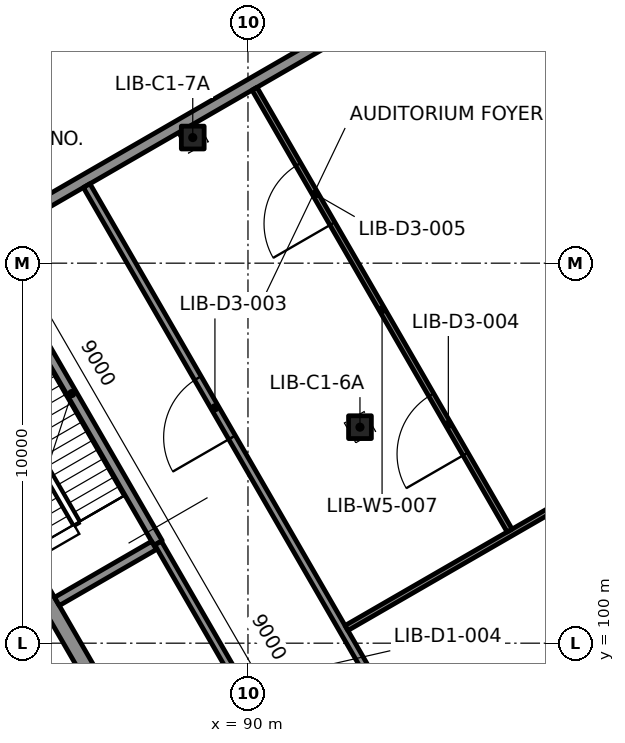
"""IFC4 building model, lengths in metres.
Left out: names, types, materials, properties, quantities, classifications, styles, units other than length and angle.
Written with IfcOpenShell. Run it as: python <this file> out.ifc"""

import sys

from ifc_helpers import new_model, si_unit, direction, frame, frame_2d, origin, origin_2d, place, context, subcontext, project, spatial, rectangle, extrude, element, fill, save


model = new_model("IFC4")
c1 = context("Model", 3, precision=1e-05, world=origin(), true_north=direction((0.0, 1.0)))
c2 = subcontext(c1, "Body", "Model", "MODEL_VIEW")
j1 = project(units=[si_unit("LENGTHUNIT", "METRE"), si_unit("PLANEANGLEUNIT", "RADIAN")], contexts=[c1])
p1 = place(None, origin())
s1 = spatial("IfcSite", under=j1, at=p1, CompositionType="ELEMENT")
p2 = place(p1, origin())
s2 = spatial("IfcBuilding", under=s1, at=p2, CompositionType="ELEMENT")
p3 = place(p2, origin())
s3 = spatial("IfcBuildingStorey", under=s2, at=p3, CompositionType="ELEMENT", Elevation=0.0)
p4 = place(p3, frame((107.504, 60.451, 0.0), z_axis=(0.0, 0.0, 1.0), x_axis=(-0.500000550228, 0.86602508611, 0.0)))
e1 = element("IfcWall", 1, at=p4, inside=s3, PredefinedType="SOLIDWALL", context=c2, shape_type="SweptSolid", body=[
    extrude(rectangle(XDim=57.704, YDim=0.3, at=frame_2d((28.852, 0.0))), origin(), (0.0, 0.0, 1.0), 7.7),
])
p5 = place(p4, frame((56.104, 0.0, 0.0)))
e2 = element("IfcOpeningElement", 2, at=p5, cuts=e1, PredefinedType="OPENING", context=c2, shape_type="SweptSolid", body=[
    extrude(rectangle(XDim=1.2, YDim=2.4, at=frame_2d((0.6, 1.2))), frame((0.0, 0.16, 0.0), z_axis=(0.0, -1.0, 0.0), x_axis=(1.0, 0.0, 0.0)), (0.0, 0.0, 1.0), 0.32),
])
p6 = place(p4, frame((1.552, 0.0, 0.15)))
e3 = element("IfcOpeningElement", 3, at=p6, cuts=e1, PredefinedType="OPENING", context=c2, shape_type="SweptSolid", body=[
    extrude(rectangle(XDim=2.1, YDim=5.4, at=frame_2d((1.05, 2.7))), frame((0.0, 0.16, 0.0), z_axis=(0.0, -1.0, 0.0), x_axis=(1.0, 0.0, 0.0)), (0.0, 0.0, 1.0), 0.32),
])
p7 = place(p4, frame((4.052, 0.0, 0.15)))
e4 = element("IfcOpeningElement", 4, at=p7, cuts=e1, PredefinedType="OPENING", context=c2, shape_type="SweptSolid", body=[
    extrude(rectangle(XDim=2.1, YDim=5.4, at=frame_2d((1.05, 2.7))), frame((0.0, 0.16, 0.0), z_axis=(0.0, -1.0, 0.0), x_axis=(1.0, 0.0, 0.0)), (0.0, 0.0, 1.0), 0.32),
])
p8 = place(p4, frame((6.552, 0.0, 0.15)))
e5 = element("IfcOpeningElement", 5, at=p8, cuts=e1, PredefinedType="OPENING", context=c2, shape_type="SweptSolid", body=[
    extrude(rectangle(XDim=2.1, YDim=5.4, at=frame_2d((1.05, 2.7))), frame((0.0, 0.16, 0.0), z_axis=(0.0, -1.0, 0.0), x_axis=(1.0, 0.0, 0.0)), (0.0, 0.0, 1.0), 0.32),
])
p9 = place(p4, frame((9.052, 0.0, 0.15)))
e6 = element("IfcOpeningElement", 6, at=p9, cuts=e1, PredefinedType="OPENING", context=c2, shape_type="SweptSolid", body=[
    extrude(rectangle(XDim=2.1, YDim=5.4, at=frame_2d((1.05, 2.7))), frame((0.0, 0.16, 0.0), z_axis=(0.0, -1.0, 0.0), x_axis=(1.0, 0.0, 0.0)), (0.0, 0.0, 1.0), 0.32),
])
p10 = place(p4, frame((11.552, 0.0, 0.15)))
e7 = element("IfcOpeningElement", 7, at=p10, cuts=e1, PredefinedType="OPENING", context=c2, shape_type="SweptSolid", body=[
    extrude(rectangle(XDim=2.1, YDim=5.4, at=frame_2d((1.05, 2.7))), frame((0.0, 0.16, 0.0), z_axis=(0.0, -1.0, 0.0), x_axis=(1.0, 0.0, 0.0)), (0.0, 0.0, 1.0), 0.32),
])
p11 = place(p4, frame((14.052, 0.0, 0.15)))
e8 = element("IfcOpeningElement", 8, at=p11, cuts=e1, PredefinedType="OPENING", context=c2, shape_type="SweptSolid", body=[
    extrude(rectangle(XDim=2.1, YDim=5.4, at=frame_2d((1.05, 2.7))), frame((0.0, 0.16, 0.0), z_axis=(0.0, -1.0, 0.0), x_axis=(1.0, 0.0, 0.0)), (0.0, 0.0, 1.0), 0.32),
])
p12 = place(p4, frame((16.552, 0.0, 0.15)))
e9 = element("IfcOpeningElement", 9, at=p12, cuts=e1, PredefinedType="OPENING", context=c2, shape_type="SweptSolid", body=[
    extrude(rectangle(XDim=2.1, YDim=5.4, at=frame_2d((1.05, 2.7))), frame((0.0, 0.16, 0.0), z_axis=(0.0, -1.0, 0.0), x_axis=(1.0, 0.0, 0.0)), (0.0, 0.0, 1.0), 0.32),
])
p13 = place(p4, frame((19.052, 0.0, 0.15)))
e10 = element("IfcOpeningElement", 10, at=p13, cuts=e1, PredefinedType="OPENING", context=c2, shape_type="SweptSolid", body=[
    extrude(rectangle(XDim=2.1, YDim=5.4, at=frame_2d((1.05, 2.7))), frame((0.0, 0.16, 0.0), z_axis=(0.0, -1.0, 0.0), x_axis=(1.0, 0.0, 0.0)), (0.0, 0.0, 1.0), 0.32),
])
p14 = place(p4, frame((21.552, 0.0, 0.15)))
e11 = element("IfcOpeningElement", 11, at=p14, cuts=e1, PredefinedType="OPENING", context=c2, shape_type="SweptSolid", body=[
    extrude(rectangle(XDim=2.1, YDim=5.4, at=frame_2d((1.05, 2.7))), frame((0.0, 0.16, 0.0), z_axis=(0.0, -1.0, 0.0), x_axis=(1.0, 0.0, 0.0)), (0.0, 0.0, 1.0), 0.32),
])
p15 = place(p4, frame((24.052, 0.0, 0.15)))
e12 = element("IfcOpeningElement", 12, at=p15, cuts=e1, PredefinedType="OPENING", context=c2, shape_type="SweptSolid", body=[
    extrude(rectangle(XDim=2.1, YDim=5.4, at=frame_2d((1.05, 2.7))), frame((0.0, 0.16, 0.0), z_axis=(0.0, -1.0, 0.0), x_axis=(1.0, 0.0, 0.0)), (0.0, 0.0, 1.0), 0.32),
])
p16 = place(p4, frame((26.552, 0.0, 0.15)))
e13 = element("IfcOpeningElement", 13, at=p16, cuts=e1, PredefinedType="OPENING", context=c2, shape_type="SweptSolid", body=[
    extrude(rectangle(XDim=2.1, YDim=5.4, at=frame_2d((1.05, 2.7))), frame((0.0, 0.16, 0.0), z_axis=(0.0, -1.0, 0.0), x_axis=(1.0, 0.0, 0.0)), (0.0, 0.0, 1.0), 0.32),
])
p17 = place(p4, frame((29.052, 0.0, 0.15)))
e14 = element("IfcOpeningElement", 14, at=p17, cuts=e1, PredefinedType="OPENING", context=c2, shape_type="SweptSolid", body=[
    extrude(rectangle(XDim=2.1, YDim=5.4, at=frame_2d((1.05, 2.7))), frame((0.0, 0.16, 0.0), z_axis=(0.0, -1.0, 0.0), x_axis=(1.0, 0.0, 0.0)), (0.0, 0.0, 1.0), 0.32),
])
p18 = place(p4, frame((31.552, 0.0, 0.15)))
e15 = element("IfcOpeningElement", 15, at=p18, cuts=e1, PredefinedType="OPENING", context=c2, shape_type="SweptSolid", body=[
    extrude(rectangle(XDim=2.1, YDim=5.4, at=frame_2d((1.05, 2.7))), frame((0.0, 0.16, 0.0), z_axis=(0.0, -1.0, 0.0), x_axis=(1.0, 0.0, 0.0)), (0.0, 0.0, 1.0), 0.32),
])
p19 = place(p4, frame((34.052, 0.0, 0.15)))
e16 = element("IfcOpeningElement", 16, at=p19, cuts=e1, PredefinedType="OPENING", context=c2, shape_type="SweptSolid", body=[
    extrude(rectangle(XDim=2.1, YDim=5.4, at=frame_2d((1.05, 2.7))), frame((0.0, 0.16, 0.0), z_axis=(0.0, -1.0, 0.0), x_axis=(1.0, 0.0, 0.0)), (0.0, 0.0, 1.0), 0.32),
])
p20 = place(p4, frame((36.552, 0.0, 0.15)))
e17 = element("IfcOpeningElement", 17, at=p20, cuts=e1, PredefinedType="OPENING", context=c2, shape_type="SweptSolid", body=[
    extrude(rectangle(XDim=2.1, YDim=5.4, at=frame_2d((1.05, 2.7))), frame((0.0, 0.16, 0.0), z_axis=(0.0, -1.0, 0.0), x_axis=(1.0, 0.0, 0.0)), (0.0, 0.0, 1.0), 0.32),
])
p21 = place(p4, frame((39.052, 0.0, 0.15)))
e18 = element("IfcOpeningElement", 18, at=p21, cuts=e1, PredefinedType="OPENING", context=c2, shape_type="SweptSolid", body=[
    extrude(rectangle(XDim=2.1, YDim=5.4, at=frame_2d((1.05, 2.7))), frame((0.0, 0.16, 0.0), z_axis=(0.0, -1.0, 0.0), x_axis=(1.0, 0.0, 0.0)), (0.0, 0.0, 1.0), 0.32),
])
p22 = place(p4, frame((41.552, 0.0, 0.15)))
e19 = element("IfcOpeningElement", 19, at=p22, cuts=e1, PredefinedType="OPENING", context=c2, shape_type="SweptSolid", body=[
    extrude(rectangle(XDim=2.1, YDim=5.4, at=frame_2d((1.05, 2.7))), frame((0.0, 0.16, 0.0), z_axis=(0.0, -1.0, 0.0), x_axis=(1.0, 0.0, 0.0)), (0.0, 0.0, 1.0), 0.32),
])
p23 = place(p4, frame((44.052, 0.0, 0.15)))
e20 = element("IfcOpeningElement", 20, at=p23, cuts=e1, PredefinedType="OPENING", context=c2, shape_type="SweptSolid", body=[
    extrude(rectangle(XDim=2.1, YDim=5.4, at=frame_2d((1.05, 2.7))), frame((0.0, 0.16, 0.0), z_axis=(0.0, -1.0, 0.0), x_axis=(1.0, 0.0, 0.0)), (0.0, 0.0, 1.0), 0.32),
])
p24 = place(p4, frame((46.552, 0.0, 0.15)))
e21 = element("IfcOpeningElement", 21, at=p24, cuts=e1, PredefinedType="OPENING", context=c2, shape_type="SweptSolid", body=[
    extrude(rectangle(XDim=2.1, YDim=5.4, at=frame_2d((1.05, 2.7))), frame((0.0, 0.16, 0.0), z_axis=(0.0, -1.0, 0.0), x_axis=(1.0, 0.0, 0.0)), (0.0, 0.0, 1.0), 0.32),
])
p25 = place(p4, frame((49.052, 0.0, 0.15)))
e22 = element("IfcOpeningElement", 22, at=p25, cuts=e1, PredefinedType="OPENING", context=c2, shape_type="SweptSolid", body=[
    extrude(rectangle(XDim=2.1, YDim=5.4, at=frame_2d((1.05, 2.7))), frame((0.0, 0.16, 0.0), z_axis=(0.0, -1.0, 0.0), x_axis=(1.0, 0.0, 0.0)), (0.0, 0.0, 1.0), 0.32),
])
p26 = place(p4, frame((51.552, 0.0, 0.15)))
e23 = element("IfcOpeningElement", 23, at=p26, cuts=e1, PredefinedType="OPENING", context=c2, shape_type="SweptSolid", body=[
    extrude(rectangle(XDim=2.1, YDim=5.4, at=frame_2d((1.05, 2.7))), frame((0.0, 0.16, 0.0), z_axis=(0.0, -1.0, 0.0), x_axis=(1.0, 0.0, 0.0)), (0.0, 0.0, 1.0), 0.32),
])
for number, where, z_axis, x_axis in (
    (24, (92.947, 105.684, -0.3), (0.0, 0.0, 1.0), (1.0, 0.0, 0.0)),
    (25, (88.547, 113.305, -0.3), (0.0, 0.0, 1.0), (1.0, 0.0, 0.0)),
):
    element("IfcColumn", number, at=place(p3, frame(where, z_axis=z_axis, x_axis=x_axis)), inside=s3, PredefinedType="COLUMN", context=c2, shape_type="SweptSolid", body=[
        extrude(rectangle(XDim=0.6, YDim=0.6, at=origin_2d()), origin(), (0.0, 0.0, 1.0), 7.94),
    ])
p27 = place(p3, frame((107.106, 62.36, 0.0), z_axis=(0.0, 0.0, 1.0), x_axis=(-0.49999992739, 0.866025445706, 0.0)))
e26 = element("IfcWall", 26, at=p27, inside=s3, PredefinedType="SOLIDWALL", context=c2, shape_type="SweptSolid", body=[
    extrude(rectangle(XDim=54.0, YDim=0.4, at=frame_2d((27.0, 0.0))), origin(), (0.0, 0.0, 1.0), 7.64),
])
p28 = place(p3, frame((80.354, 109.095, 0.0), z_axis=(0.0, 0.0, 1.0), x_axis=(0.866026568746, 0.499997982221, 0.0)))
e27 = element("IfcWall", 27, at=p28, inside=s3, PredefinedType="SOLIDWALL", context=c2, shape_type="SweptSolid", body=[
    extrude(rectangle(XDim=29.3, YDim=0.3, at=frame_2d((14.65, 0.0))), origin(), (0.0, 0.0, 1.0), 7.64),
])
p29 = place(p28, frame((0.875, 0.0, 0.0)))
e28 = element("IfcOpeningElement", 28, at=p29, cuts=e27, PredefinedType="OPENING", context=c2, shape_type="SweptSolid", body=[
    extrude(rectangle(XDim=1.2, YDim=2.2, at=frame_2d((0.6, 1.1))), frame((0.0, 0.16, 0.0), z_axis=(0.0, -1.0, 0.0), x_axis=(1.0, 0.0, 0.0)), (0.0, 0.0, 1.0), 0.32),
])
p30 = place(p3, frame((87.635, 102.635, 0.0), z_axis=(0.0, 0.0, 1.0), x_axis=(-0.499994616197, 0.866028512102, 0.0)))
e29 = element("IfcWall", 29, at=p30, inside=s3, PredefinedType="SOLIDWALL", context=c2, shape_type="SweptSolid", body=[
    extrude(rectangle(XDim=9.085, YDim=0.25, at=frame_2d((4.542, 0.0))), origin(), (0.0, 0.0, 1.0), 7.64),
])
p31 = place(p30, frame((7.885, 0.0, 0.0)))
e30 = element("IfcOpeningElement", 30, at=p31, cuts=e29, PredefinedType="OPENING", context=c2, shape_type="SweptSolid", body=[
    extrude(rectangle(XDim=1.0, YDim=2.1, at=frame_2d((0.5, 1.05))), frame((0.0, 0.135, 0.0), z_axis=(0.0, -1.0, 0.0), x_axis=(1.0, 0.0, 0.0)), (0.0, 0.0, 1.0), 0.27),
])
p32 = place(p3, frame((94.93, 90.0, 0.0), z_axis=(0.0, 0.0, 1.0), x_axis=(-0.499997667785, 0.866026750285, 0.0)))
e31 = element("IfcWall", 31, at=p32, inside=s3, PredefinedType="PARTITIONING", context=c2, shape_type="SweptSolid", body=[
    extrude(rectangle(XDim=14.59, YDim=0.2, at=frame_2d((7.295, 0.0))), origin(), (0.0, 0.0, 1.0), 7.64),
])
p33 = place(p32, frame((1.235, 0.0, 0.0)))
e32 = element("IfcOpeningElement", 32, at=p33, cuts=e31, PredefinedType="OPENING", context=c2, shape_type="SweptSolid", body=[
    extrude(rectangle(XDim=1.0, YDim=2.1, at=frame_2d((0.5, 1.05))), frame((0.0, 0.11, 0.0), z_axis=(0.0, -1.0, 0.0), x_axis=(1.0, 0.0, 0.0)), (0.0, 0.0, 1.0), 0.22),
])
p34 = place(p32, frame((4.275, 0.0, 0.0)))
e33 = element("IfcOpeningElement", 33, at=p34, cuts=e31, PredefinedType="OPENING", context=c2, shape_type="SweptSolid", body=[
    extrude(rectangle(XDim=0.9, YDim=2.1, at=frame_2d((0.45, 1.05))), frame((0.0, 0.11, 0.0), z_axis=(0.0, -1.0, 0.0), x_axis=(1.0, 0.0, 0.0)), (0.0, 0.0, 1.0), 0.22),
])
p35 = place(p32, frame((9.825, 0.0, 0.0)))
e34 = element("IfcOpeningElement", 34, at=p35, cuts=e31, PredefinedType="OPENING", context=c2, shape_type="SweptSolid", body=[
    extrude(rectangle(XDim=0.9, YDim=2.1, at=frame_2d((0.45, 1.05))), frame((0.0, 0.11, 0.0), z_axis=(0.0, -1.0, 0.0), x_axis=(1.0, 0.0, 0.0)), (0.0, 0.0, 1.0), 0.22),
])
p36 = place(p3, frame((84.972, 101.097, 0.0), z_axis=(0.0, 0.0, 1.0), x_axis=(0.866039495442, 0.49997559174, 0.0)))
e35 = element("IfcWall", 35, at=p36, inside=s3, PredefinedType="SOLIDWALL", context=c2, shape_type="SweptSolid", body=[
    extrude(rectangle(XDim=2.95, YDim=0.25, at=frame_2d((1.475, 0.0))), origin(), (0.0, 0.0, 1.0), 7.64),
])
p37 = place(p3, frame((112.456, 65.794, 0.0), z_axis=(0.0, 0.0, 1.0), x_axis=(-0.499998559706, 0.866026235337, 0.0)))
e36 = element("IfcWall", 36, at=p37, inside=s3, PredefinedType="PARTITIONING", context=c2, shape_type="SweptSolid", body=[
    extrude(rectangle(XDim=53.4, YDim=0.2, at=frame_2d((26.7, 0.0))), origin(), (0.0, 0.0, 1.0), 7.64),
])
p38 = place(p37, frame((12.6, 0.0, 0.0)))
e37 = element("IfcOpeningElement", 37, at=p38, cuts=e36, PredefinedType="OPENING", context=c2, shape_type="SweptSolid", body=[
    extrude(rectangle(XDim=1.8, YDim=2.1, at=frame_2d((0.9, 1.05))), frame((0.0, 0.11, 0.0), z_axis=(0.0, -1.0, 0.0), x_axis=(1.0, 0.0, 0.0)), (0.0, 0.0, 1.0), 0.22),
])
p39 = place(p37, frame((25.8, 0.0, 0.0)))
e38 = element("IfcOpeningElement", 38, at=p39, cuts=e36, PredefinedType="OPENING", context=c2, shape_type="SweptSolid", body=[
    extrude(rectangle(XDim=1.8, YDim=2.1, at=frame_2d((0.9, 1.05))), frame((0.0, 0.11, 0.0), z_axis=(0.0, -1.0, 0.0), x_axis=(1.0, 0.0, 0.0)), (0.0, 0.0, 1.0), 0.22),
])
p40 = place(p37, frame((35.0, 0.0, 0.0)))
e39 = element("IfcOpeningElement", 39, at=p40, cuts=e36, PredefinedType="OPENING", context=c2, shape_type="SweptSolid", body=[
    extrude(rectangle(XDim=1.0, YDim=2.1, at=frame_2d((0.5, 1.05))), frame((0.0, 0.11, 0.0), z_axis=(0.0, -1.0, 0.0), x_axis=(1.0, 0.0, 0.0)), (0.0, 0.0, 1.0), 0.22),
])
p41 = place(p37, frame((45.75, 0.0, 0.0)))
e40 = element("IfcOpeningElement", 40, at=p41, cuts=e36, PredefinedType="OPENING", context=c2, shape_type="SweptSolid", body=[
    extrude(rectangle(XDim=1.8, YDim=2.1, at=frame_2d((0.9, 1.05))), frame((0.0, 0.11, 0.0), z_axis=(0.0, -1.0, 0.0), x_axis=(1.0, 0.0, 0.0)), (0.0, 0.0, 1.0), 0.22),
])
for number, where, z_axis, x_axis in (
    (41, (96.992, 92.778, 0.0), (0.0, 0.0, 1.0), (0.866, 0.5, 0.0)),
    (42, (92.592, 100.399, 0.0), (0.0, 0.0, 1.0), (0.866, 0.5, 0.0)),
):
    element("IfcWall", number, at=place(p3, frame(where, z_axis=z_axis, x_axis=x_axis)), inside=s3, PredefinedType="PARTITIONING", context=c2, shape_type="SweptSolid", body=[
        extrude(rectangle(XDim=23.05, YDim=0.15, at=frame_2d((11.525, 0.0))), origin(), (0.0, 0.0, 1.0), 7.64),
    ])
p42 = place(p3, frame((96.885, 102.964, 0.0), z_axis=(0.0, 0.0, 1.0), x_axis=(-0.500013677766, 0.866017506779, 0.0)))
e43 = element("IfcWall", 43, at=p42, inside=s3, PredefinedType="PARTITIONING", context=c2, shape_type="SweptSolid", body=[
    extrude(rectangle(XDim=13.425, YDim=0.15, at=frame_2d((6.712, 0.0))), origin(), (0.0, 0.0, 1.0), 7.64),
])
p43 = place(p42, frame((2.325, 0.0, 0.0)))
e44 = element("IfcOpeningElement", 44, at=p43, cuts=e43, PredefinedType="OPENING", context=c2, shape_type="SweptSolid", body=[
    extrude(rectangle(XDim=1.8, YDim=2.1, at=frame_2d((0.9, 1.05))), frame((0.0, 0.085, 0.0), z_axis=(0.0, -1.0, 0.0), x_axis=(1.0, 0.0, 0.0)), (0.0, 0.0, 1.0), 0.17),
])
p44 = place(p42, frame((9.325, 0.0, 0.0)))
e45 = element("IfcOpeningElement", 45, at=p44, cuts=e43, PredefinedType="OPENING", context=c2, shape_type="SweptSolid", body=[
    extrude(rectangle(XDim=1.8, YDim=2.1, at=frame_2d((0.9, 1.05))), frame((0.0, 0.085, 0.0), z_axis=(0.0, -1.0, 0.0), x_axis=(1.0, 0.0, 0.0)), (0.0, 0.0, 1.0), 0.17),
])
p45 = place(p23, origin())
e46 = element("IfcWindow", 46, at=p45, inside=s3, PartitioningType="SINGLE_PANEL", PredefinedType="WINDOW", context=c2, shape_type="SweptSolid", body=[
    extrude(rectangle(XDim=2.1, YDim=5.4, at=frame_2d((1.05, 2.7))), frame((0.0, 0.03, 0.0), z_axis=(0.0, -1.0, 0.0), x_axis=(1.0, 0.0, 0.0)), (0.0, 0.0, 1.0), 0.06),
])
fill(e20, e46)
p46 = place(p41, origin())
e47 = element("IfcDoor", 47, at=p46, inside=s3, OperationType="DOUBLE_DOOR_SINGLE_SWING", PredefinedType="DOOR", context=c2, shape_type="SweptSolid", body=[
    extrude(rectangle(XDim=1.8, YDim=2.1, at=frame_2d((0.9, 1.05))), frame((0.0, 0.025, 0.0), z_axis=(0.0, -1.0, 0.0), x_axis=(1.0, 0.0, 0.0)), (0.0, 0.0, 1.0), 0.05),
])
fill(e40, e47)
p47 = place(p43, origin())
e48 = element("IfcDoor", 48, at=p47, inside=s3, OperationType="DOUBLE_DOOR_SINGLE_SWING", PredefinedType="DOOR", context=c2, shape_type="SweptSolid", body=[
    extrude(rectangle(XDim=1.8, YDim=2.1, at=frame_2d((0.9, 1.05))), frame((0.0, 0.025, 0.0), z_axis=(0.0, -1.0, 0.0), x_axis=(1.0, 0.0, 0.0)), (0.0, 0.0, 1.0), 0.05),
])
fill(e44, e48)
p48 = place(p44, origin())
e49 = element("IfcDoor", 49, at=p48, inside=s3, OperationType="DOUBLE_DOOR_SINGLE_SWING", PredefinedType="DOOR", context=c2, shape_type="SweptSolid", body=[
    extrude(rectangle(XDim=1.8, YDim=2.1, at=frame_2d((0.9, 1.05))), frame((0.0, 0.025, 0.0), z_axis=(0.0, -1.0, 0.0), x_axis=(1.0, 0.0, 0.0)), (0.0, 0.0, 1.0), 0.05),
])
fill(e45, e49)
save(model, sys.argv[1])
